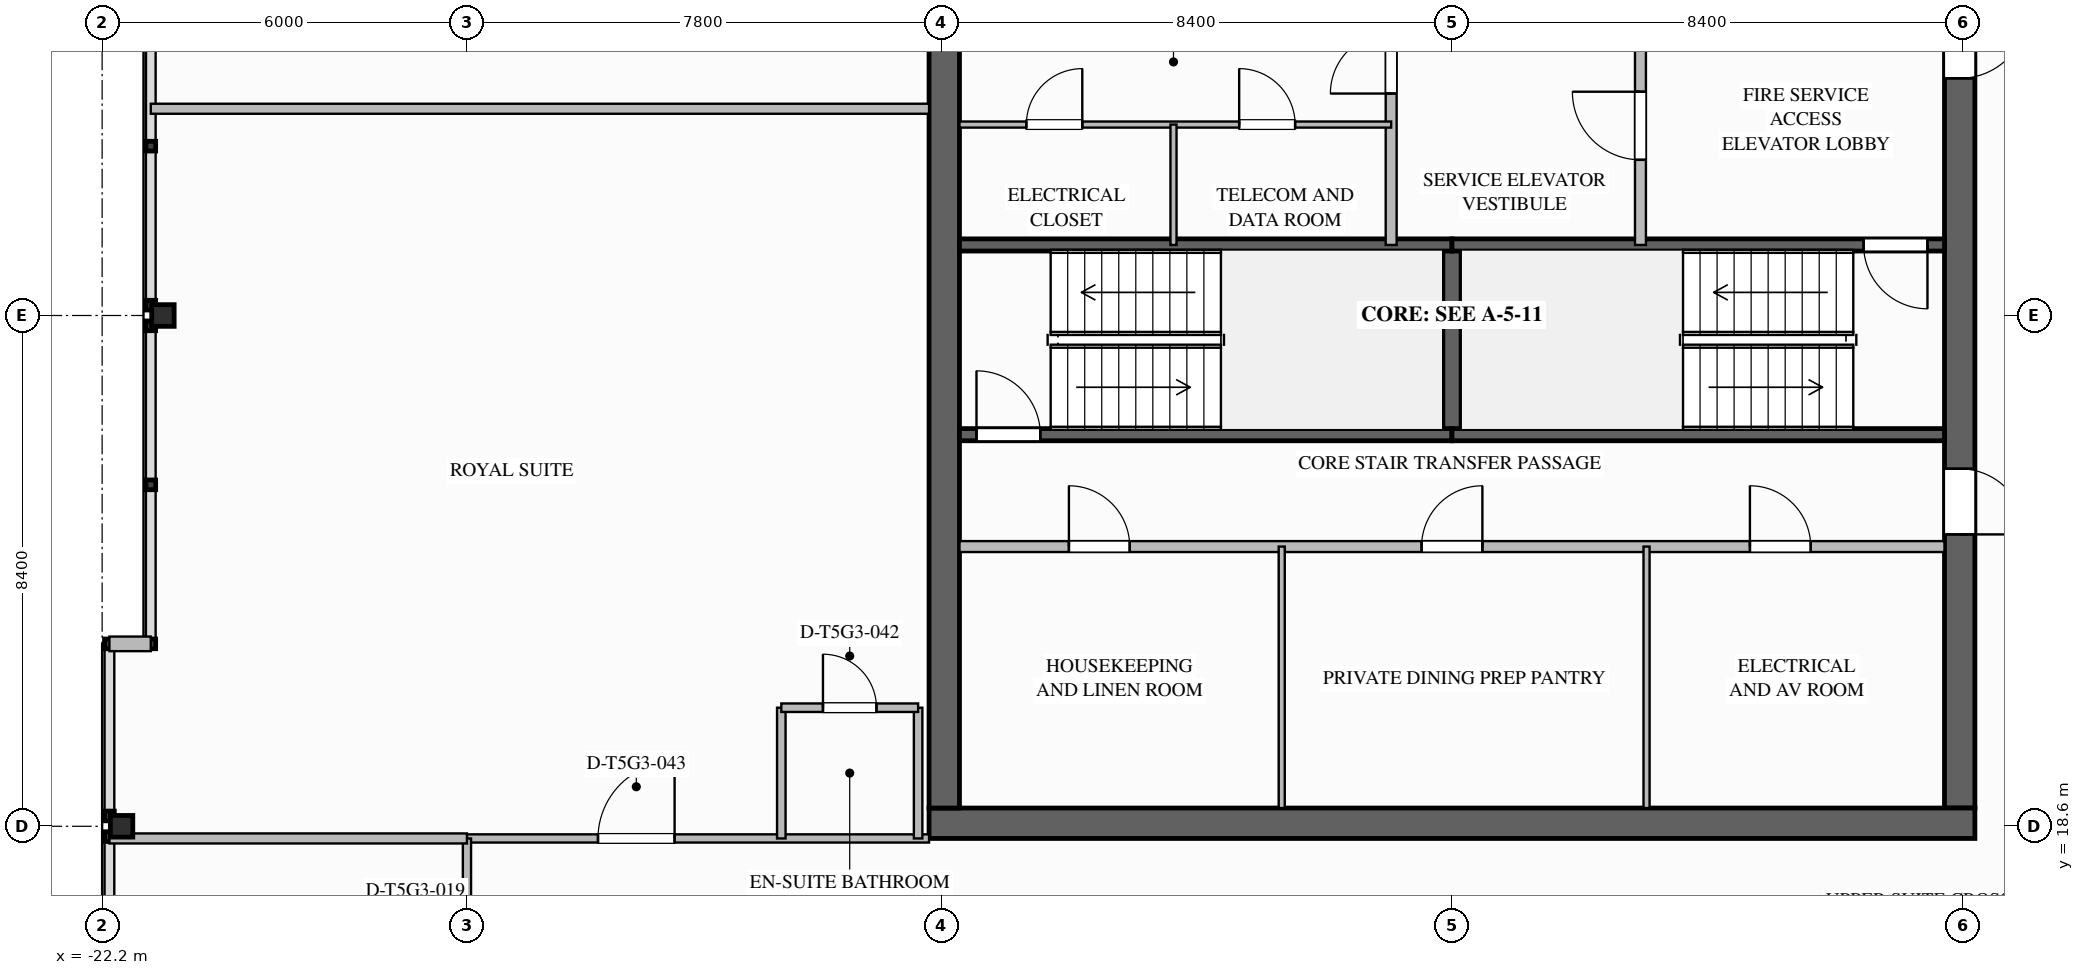
"""IFC4 building model, lengths in metres.
Left out: names, types, materials, properties, quantities, classifications, styles, units other than length and angle.
Written with IfcOpenShell. Run it as: python <this file> out.ifc"""

import sys

from ifc_helpers import new_model, si_unit, direction, frame, frame_2d, origin, origin_2d, place, context, subcontext, project, spatial, rectangle, i_section, extrude, element, fill, save


model = new_model("IFC4")
c1 = context("Model", 3, precision=1e-05, world=origin(), true_north=direction((0.0, 1.0)))
c2 = subcontext(c1, "Body", "Model", "MODEL_VIEW")
j1 = project(units=[si_unit("LENGTHUNIT", "METRE"), si_unit("PLANEANGLEUNIT", "RADIAN")], contexts=[c1])
p1 = place(None, origin())
s1 = spatial("IfcSite", under=j1, at=p1, CompositionType="ELEMENT")
p2 = place(p1, origin())
s2 = spatial("IfcBuilding", under=s1, at=p2, CompositionType="ELEMENT")
p3 = place(p2, frame((0.0, 0.0, 286.9)))
s3 = spatial("IfcBuildingStorey", under=s2, at=p3, CompositionType="ELEMENT", Elevation=286.9)
p4 = place(p3, frame((8.35, 35.1, 0.0), z_axis=(0.0, 0.0, 1.0), x_axis=(0.0, -1.0, 0.0)))
e1 = element("IfcWall", 1, at=p4, inside=s3, PredefinedType="SHEAR", context=c2, shape_type="SweptSolid", body=[
    extrude(rectangle(XDim=16.2, YDim=0.5, at=frame_2d((8.1, 0.0))), origin(), (0.0, 0.0, 1.0), 3.65),
])
p5 = place(p4, frame((3.08, 0.0, 0.0)))
e2 = element("IfcOpeningElement", 2, at=p5, cuts=e1, PredefinedType="OPENING", context=c2, shape_type="SweptSolid", body=[
    extrude(rectangle(XDim=1.12, YDim=2.1, at=frame_2d((0.56, 1.05))), frame((0.0, 0.26, 0.0), z_axis=(0.0, -1.0, 0.0), x_axis=(1.0, 0.0, 0.0)), (0.0, 0.0, 1.0), 0.52),
])
p6 = place(p4, frame((10.62, 0.0, 0.0)))
e3 = element("IfcOpeningElement", 3, at=p6, cuts=e1, PredefinedType="OPENING", context=c2, shape_type="SweptSolid", body=[
    extrude(rectangle(XDim=1.08, YDim=2.04, at=frame_2d((0.54, 1.02))), frame((0.0, 0.26, 0.0), z_axis=(0.0, -1.0, 0.0), x_axis=(1.0, 0.0, 0.0)), (0.0, 0.0, 1.0), 0.52),
])
p7 = place(p3, frame((8.6, 18.65, 0.0), z_axis=(0.0, 0.0, 1.0), x_axis=(-1.0, 0.0, 0.0)))
e4 = element("IfcWall", 4, at=p7, inside=s3, PredefinedType="SHEAR", context=c2, shape_type="SweptSolid", body=[
    extrude(rectangle(XDim=17.2, YDim=0.5, at=frame_2d((8.6, 0.0))), origin(), (0.0, 0.0, 1.0), 3.65),
])
p8 = place(p3, frame((-8.35, 18.9, 0.0), z_axis=(0.0, 0.0, 1.0), x_axis=(0.0, 1.0, 0.0)))
e5 = element("IfcWall", 5, at=p8, inside=s3, PredefinedType="SHEAR", context=c2, shape_type="SweptSolid", body=[
    extrude(rectangle(XDim=16.2, YDim=0.5, at=frame_2d((8.1, 0.0))), origin(), (0.0, 0.0, 1.0), 3.65),
])
for number, where, z_axis, x_axis in (
    (6, (-21.88, 18.6, 0.0), (0.0, 0.0, 1.0), (1.0, 0.0, 0.0)),
    (7, (-21.2, 27.0, 0.0), (0.0, 0.0, 1.0), (1.0, 0.0, 0.0)),
):
    element("IfcColumn", number, at=place(p3, frame(where, z_axis=z_axis, x_axis=x_axis)), inside=s3, PredefinedType="COLUMN", context=c2, shape_type="SweptSolid", body=[
        extrude(i_section(OverallWidth=0.369, OverallDepth=0.356, WebThickness=0.011, FlangeThickness=0.018, FilletRadius=0.025, at=origin_2d()), origin(), (0.0, 0.0, 1.0), 3.647),
    ])
p9 = place(p3, frame((-22.08, 21.6, 0.0), z_axis=(0.0, 0.0, 1.0), x_axis=(1.0, 0.0, 0.0)))
e8 = element("IfcWall", 8, at=p9, inside=s3, PredefinedType="STANDARD", context=c2, shape_type="SweptSolid", body=[
    extrude(rectangle(XDim=0.68, YDim=0.24, at=frame_2d((0.34, 0.0))), origin(), (0.0, 0.0, 1.0), 3.39),
])
p10 = place(p3, frame((0.0, 25.04, 0.0), z_axis=(0.0, 0.0, 1.0), x_axis=(0.0, 1.0, 0.0)))
e9 = element("IfcWall", 9, at=p10, inside=s3, PredefinedType="SOLIDWALL", context=c2, shape_type="SweptSolid", body=[
    extrude(rectangle(XDim=3.12, YDim=0.3, at=frame_2d((1.56, 0.0))), origin(), (0.0, 0.0, 1.0), 3.39),
])
p11 = place(p3, frame((-8.1, 25.04, 0.0), z_axis=(0.0, 0.0, 1.0), x_axis=(1.0, 0.0, 0.0)))
e10 = element("IfcWall", 10, at=p11, inside=s3, PredefinedType="SOLIDWALL", context=c2, shape_type="SweptSolid", body=[
    extrude(rectangle(XDim=8.1, YDim=0.2, at=frame_2d((4.05, 0.0))), origin(), (0.0, 0.0, 1.0), 3.39),
])
p12 = place(p11, frame((0.28, 0.0, 0.0)))
e11 = element("IfcOpeningElement", 11, at=p12, cuts=e10, PredefinedType="OPENING", context=c2, shape_type="SweptSolid", body=[
    extrude(rectangle(XDim=1.05, YDim=2.1, at=frame_2d((0.525, 1.05))), frame((0.0, 0.11, 0.0), z_axis=(0.0, -1.0, 0.0), x_axis=(1.0, 0.0, 0.0)), (0.0, 0.0, 1.0), 0.22),
])
for number, where, z_axis, x_axis in (
    (12, (-8.1, 28.16, 0.0), (0.0, 0.0, 1.0), (1.0, 0.0, 0.0)),
    (13, (0.0, 25.04, 0.0), (0.0, 0.0, 1.0), (1.0, 0.0, 0.0)),
):
    element("IfcWall", number, at=place(p3, frame(where, z_axis=z_axis, x_axis=x_axis)), inside=s3, PredefinedType="SOLIDWALL", context=c2, shape_type="SweptSolid", body=[
        extrude(rectangle(XDim=8.1, YDim=0.2, at=frame_2d((4.05, 0.0))), origin(), (0.0, 0.0, 1.0), 3.39),
    ])
p13 = place(p3, frame((8.1, 28.16, 0.0), z_axis=(0.0, 0.0, 1.0), x_axis=(-1.0, 0.0, 0.0)))
e14 = element("IfcWall", 14, at=p13, inside=s3, PredefinedType="SOLIDWALL", context=c2, shape_type="SweptSolid", body=[
    extrude(rectangle(XDim=8.1, YDim=0.2, at=frame_2d((4.05, 0.0))), origin(), (0.0, 0.0, 1.0), 3.39),
])
p14 = place(p13, frame((0.28, 0.0, 0.0)))
e15 = element("IfcOpeningElement", 15, at=p14, cuts=e14, PredefinedType="OPENING", context=c2, shape_type="SweptSolid", body=[
    extrude(rectangle(XDim=1.05, YDim=2.1, at=frame_2d((0.525, 1.05))), frame((0.0, 0.11, 0.0), z_axis=(0.0, -1.0, 0.0), x_axis=(1.0, 0.0, 0.0)), (0.0, 0.0, 1.0), 0.22),
])
p15 = place(p3, frame((3.1, 28.16, 0.0), z_axis=(0.0, 0.0, 1.0), x_axis=(0.0, 1.0, 0.0)))
e16 = element("IfcWall", 16, at=p15, inside=s3, PredefinedType="SOLIDWALL", context=c2, shape_type="SweptSolid", body=[
    extrude(rectangle(XDim=4.06, YDim=0.18, at=frame_2d((2.03, 0.0))), origin(), (0.0, 0.0, 1.0), 3.39),
])
p16 = place(p15, frame((1.4, 0.0, 0.0)))
e17 = element("IfcOpeningElement", 17, at=p16, cuts=e16, PredefinedType="OPENING", context=c2, shape_type="SweptSolid", body=[
    extrude(rectangle(XDim=1.12, YDim=2.1, at=frame_2d((0.56, 1.05))), frame((0.0, 0.1, 0.0), z_axis=(0.0, -1.0, 0.0), x_axis=(1.0, 0.0, 0.0)), (0.0, 0.0, 1.0), 0.2),
])
p17 = place(p3, frame((-1.0, 28.16, 0.0), z_axis=(0.0, 0.0, 1.0), x_axis=(0.0, 1.0, 0.0)))
e18 = element("IfcWall", 18, at=p17, inside=s3, PredefinedType="SOLIDWALL", context=c2, shape_type="SweptSolid", body=[
    extrude(rectangle(XDim=4.02, YDim=0.18, at=frame_2d((2.01, 0.0))), origin(), (0.0, 0.0, 1.0), 3.39),
])
p18 = place(p17, frame((2.49, 0.0, 0.0)))
e19 = element("IfcOpeningElement", 19, at=p18, cuts=e18, PredefinedType="OPENING", context=c2, shape_type="SweptSolid", body=[
    extrude(rectangle(XDim=1.0, YDim=2.1, at=frame_2d((0.5, 1.05))), frame((0.0, 0.1, 0.0), z_axis=(0.0, -1.0, 0.0), x_axis=(1.0, 0.0, 0.0)), (0.0, 0.0, 1.0), 0.2),
])
p19 = place(p3, frame((-8.1, 30.14, 0.0), z_axis=(0.0, 0.0, 1.0), x_axis=(1.0, 0.0, 0.0)))
e20 = element("IfcWall", 20, at=p19, inside=s3, PredefinedType="PARTITIONING", context=c2, shape_type="SweptSolid", body=[
    extrude(rectangle(XDim=7.1, YDim=0.1, at=frame_2d((3.55, 0.0))), origin(), (0.0, 0.0, 1.0), 3.39),
])
p20 = place(p19, frame((1.1, 0.0, 0.0)))
e21 = element("IfcOpeningElement", 21, at=p20, cuts=e20, PredefinedType="OPENING", context=c2, shape_type="SweptSolid", body=[
    extrude(rectangle(XDim=0.92, YDim=2.1, at=frame_2d((0.46, 1.05))), frame((0.0, 0.06, 0.0), z_axis=(0.0, -1.0, 0.0), x_axis=(1.0, 0.0, 0.0)), (0.0, 0.0, 1.0), 0.12),
])
p21 = place(p19, frame((4.6, 0.0, 0.0)))
e22 = element("IfcOpeningElement", 22, at=p21, cuts=e20, PredefinedType="OPENING", context=c2, shape_type="SweptSolid", body=[
    extrude(rectangle(XDim=0.92, YDim=2.1, at=frame_2d((0.46, 1.05))), frame((0.0, 0.06, 0.0), z_axis=(0.0, -1.0, 0.0), x_axis=(1.0, 0.0, 0.0)), (0.0, 0.0, 1.0), 0.12),
])
p22 = place(p3, frame((-4.58, 28.16, 0.0), z_axis=(0.0, 0.0, 1.0), x_axis=(0.0, 1.0, 0.0)))
e23 = element("IfcWall", 23, at=p22, inside=s3, PredefinedType="PARTITIONING", context=c2, shape_type="SweptSolid", body=[
    extrude(rectangle(XDim=1.98, YDim=0.1, at=frame_2d((0.99, 0.0))), origin(), (0.0, 0.0, 1.0), 3.39),
])
p23 = place(p3, frame((-8.1, 23.2, 0.0), z_axis=(0.0, 0.0, 1.0), x_axis=(1.0, 0.0, 0.0)))
e24 = element("IfcWall", 24, at=p23, inside=s3, PredefinedType="SOLIDWALL", context=c2, shape_type="SweptSolid", body=[
    extrude(rectangle(XDim=16.2, YDim=0.18, at=frame_2d((8.1, 0.0))), origin(), (0.0, 0.0, 1.0), 3.39),
])
p24 = place(p23, frame((1.8, 0.0, 0.0)))
e25 = element("IfcOpeningElement", 25, at=p24, cuts=e24, PredefinedType="OPENING", context=c2, shape_type="SweptSolid", body=[
    extrude(rectangle(XDim=1.0, YDim=2.1, at=frame_2d((0.5, 1.05))), frame((0.0, 0.1, 0.0), z_axis=(0.0, -1.0, 0.0), x_axis=(1.0, 0.0, 0.0)), (0.0, 0.0, 1.0), 0.2),
])
p25 = place(p23, frame((7.6, 0.0, 0.0)))
e26 = element("IfcOpeningElement", 26, at=p25, cuts=e24, PredefinedType="OPENING", context=c2, shape_type="SweptSolid", body=[
    extrude(rectangle(XDim=1.0, YDim=2.1, at=frame_2d((0.5, 1.05))), frame((0.0, 0.1, 0.0), z_axis=(0.0, -1.0, 0.0), x_axis=(1.0, 0.0, 0.0)), (0.0, 0.0, 1.0), 0.2),
])
p26 = place(p23, frame((13.0, 0.0, 0.0)))
e27 = element("IfcOpeningElement", 27, at=p26, cuts=e24, PredefinedType="OPENING", context=c2, shape_type="SweptSolid", body=[
    extrude(rectangle(XDim=1.0, YDim=2.1, at=frame_2d((0.5, 1.05))), frame((0.0, 0.1, 0.0), z_axis=(0.0, -1.0, 0.0), x_axis=(1.0, 0.0, 0.0)), (0.0, 0.0, 1.0), 0.2),
])
for number, where, z_axis, x_axis in (
    (28, (-2.8, 18.9, 0.0), (0.0, 0.0, 1.0), (0.0, 1.0, 0.0)),
    (29, (3.2, 18.9, 0.0), (0.0, 0.0, 1.0), (0.0, 1.0, 0.0)),
):
    element("IfcWall", number, at=place(p3, frame(where, z_axis=z_axis, x_axis=x_axis)), inside=s3, PredefinedType="PARTITIONING", context=c2, shape_type="SweptSolid", body=[
        extrude(rectangle(XDim=4.3, YDim=0.1, at=frame_2d((2.15, 0.0))), origin(), (0.0, 0.0, 1.0), 3.39),
    ])
p27 = place(p3, frame((-16.2, 18.4, 0.0), z_axis=(0.0, 0.0, 1.0), x_axis=(1.0, 0.0, 0.0)))
e30 = element("IfcWall", 30, at=p27, inside=s3, PredefinedType="PARTITIONING", context=c2, shape_type="SweptSolid", body=[
    extrude(rectangle(XDim=7.6, YDim=0.135, at=frame_2d((3.8, 0.0))), origin(), (0.0, 0.0, 1.0), 2.768),
])
p28 = place(p27, frame((2.155, 0.0, 0.0)))
e31 = element("IfcOpeningElement", 31, at=p28, cuts=e30, PredefinedType="OPENING", context=c2, shape_type="SweptSolid", body=[
    extrude(rectangle(XDim=1.26, YDim=2.2, at=frame_2d((0.63, 1.1))), frame((0.0, 0.077, 0.0), z_axis=(0.0, -1.0, 0.0), x_axis=(1.0, 0.0, 0.0)), (0.0, 0.0, 1.0), 0.155),
])
p29 = place(p3, frame((-16.2, 15.5, 0.0), z_axis=(0.0, 0.0, 1.0), x_axis=(0.0, 1.0, 0.0)))
e32 = element("IfcWall", 32, at=p29, inside=s3, PredefinedType="PARTITIONING", context=c2, shape_type="SweptSolid", body=[
    extrude(rectangle(XDim=2.9, YDim=0.135, at=frame_2d((1.45, 0.0))), origin(), (0.0, 0.0, 1.0), 2.764),
])
p30 = place(p29, frame((0.52, 0.0, 0.0)))
e33 = element("IfcOpeningElement", 33, at=p30, cuts=e32, PredefinedType="OPENING", context=c2, shape_type="SweptSolid", body=[
    extrude(rectangle(XDim=1.02, YDim=2.15, at=frame_2d((0.51, 1.075))), frame((0.0, 0.077, 0.0), z_axis=(0.0, -1.0, 0.0), x_axis=(1.0, 0.0, 0.0)), (0.0, 0.0, 1.0), 0.155),
])
p31 = place(p3, frame((-22.08, 18.4, 0.0), z_axis=(0.0, 0.0, 1.0), x_axis=(1.0, 0.0, 0.0)))
e34 = element("IfcWall", 34, at=p31, inside=s3, PredefinedType="PARTITIONING", context=c2, shape_type="SweptSolid", body=[
    extrude(rectangle(XDim=5.88, YDim=0.165, at=frame_2d((2.94, 0.0))), origin(), (0.0, 0.0, 1.0), 2.764),
])
p32 = place(p3, frame((-21.4, 30.4, 0.0), z_axis=(0.0, 0.0, 1.0), x_axis=(1.0, 0.0, 0.0)))
e35 = element("IfcWall", 35, at=p32, inside=s3, PredefinedType="PARTITIONING", context=c2, shape_type="SweptSolid", body=[
    extrude(rectangle(XDim=12.8, YDim=0.165, at=frame_2d((6.4, 0.0))), origin(), (0.0, 0.0, 1.0), 3.39),
])
for number, where, z_axis, x_axis in (
    (36, (-11.03, 18.4, 0.0), (0.0, 0.0, 1.0), (0.0, 1.0, 0.0)),
    (37, (-8.78, 18.4, 0.0), (0.0, 0.0, 1.0), (0.0, 1.0, 0.0)),
):
    element("IfcWall", number, at=place(p3, frame(where, z_axis=z_axis, x_axis=x_axis)), inside=s3, PredefinedType="PLUMBINGWALL", context=c2, shape_type="SweptSolid", body=[
        extrude(rectangle(XDim=2.15, YDim=0.14, at=frame_2d((1.075, 0.0))), origin(), (0.0, 0.0, 1.0), 3.39),
    ])
p33 = place(p3, frame((-11.03, 20.55, 0.0), z_axis=(0.0, 0.0, 1.0), x_axis=(1.0, 0.0, 0.0)))
e38 = element("IfcWall", 38, at=p33, inside=s3, PredefinedType="PLUMBINGWALL", context=c2, shape_type="SweptSolid", body=[
    extrude(rectangle(XDim=2.25, YDim=0.14, at=frame_2d((1.125, 0.0))), origin(), (0.0, 0.0, 1.0), 3.39),
])
p34 = place(p33, frame((0.685, 0.0, 0.0)))
e39 = element("IfcOpeningElement", 39, at=p34, cuts=e38, PredefinedType="OPENING", context=c2, shape_type="SweptSolid", body=[
    extrude(rectangle(XDim=0.88, YDim=2.1, at=frame_2d((0.44, 1.05))), frame((0.0, 0.08, 0.0), z_axis=(0.0, -1.0, 0.0), x_axis=(1.0, 0.0, 0.0)), (0.0, 0.0, 1.0), 0.16),
])
p35 = place(p12, origin())
e40 = element("IfcDoor", 40, at=p35, inside=s3, OperationType="SINGLE_SWING_LEFT", PredefinedType="DOOR", context=c2, shape_type="SweptSolid", body=[
    extrude(rectangle(XDim=1.05, YDim=2.1, at=frame_2d((0.525, 1.05))), frame((0.0, 0.025, 0.0), z_axis=(0.0, -1.0, 0.0), x_axis=(1.0, 0.0, 0.0)), (0.0, 0.0, 1.0), 0.05),
])
fill(e11, e40)
p36 = place(p14, origin())
e41 = element("IfcDoor", 41, at=p36, inside=s3, OperationType="SINGLE_SWING_LEFT", PredefinedType="DOOR", context=c2, shape_type="SweptSolid", body=[
    extrude(rectangle(XDim=1.05, YDim=2.1, at=frame_2d((0.525, 1.05))), frame((0.0, 0.025, 0.0), z_axis=(0.0, -1.0, 0.0), x_axis=(1.0, 0.0, 0.0)), (0.0, 0.0, 1.0), 0.05),
])
fill(e15, e41)
p37 = place(p16, origin())
e42 = element("IfcDoor", 42, at=p37, inside=s3, OperationType="SINGLE_SWING_RIGHT", PredefinedType="DOOR", context=c2, shape_type="SweptSolid", body=[
    extrude(rectangle(XDim=1.12, YDim=2.1, at=frame_2d((0.56, 1.05))), frame((0.0, 0.025, 0.0), z_axis=(0.0, -1.0, 0.0), x_axis=(1.0, 0.0, 0.0)), (0.0, 0.0, 1.0), 0.05),
])
fill(e17, e42)
p38 = place(p5, origin())
e43 = element("IfcDoor", 43, at=p38, inside=s3, OperationType="SINGLE_SWING_LEFT", PredefinedType="DOOR", context=c2, shape_type="SweptSolid", body=[
    extrude(rectangle(XDim=1.12, YDim=2.1, at=frame_2d((0.56, 1.05))), frame((0.0, 0.025, 0.0), z_axis=(0.0, -1.0, 0.0), x_axis=(1.0, 0.0, 0.0)), (0.0, 0.0, 1.0), 0.05),
])
fill(e2, e43)
p39 = place(p18, origin())
e44 = element("IfcDoor", 44, at=p39, inside=s3, OperationType="SINGLE_SWING_LEFT", PredefinedType="DOOR", context=c2, shape_type="SweptSolid", body=[
    extrude(rectangle(XDim=1.0, YDim=2.1, at=frame_2d((0.5, 1.05))), frame((0.0, 0.025, 0.0), z_axis=(0.0, -1.0, 0.0), x_axis=(1.0, 0.0, 0.0)), (0.0, 0.0, 1.0), 0.05),
])
fill(e19, e44)
p40 = place(p20, origin())
e45 = element("IfcDoor", 45, at=p40, inside=s3, OperationType="SINGLE_SWING_RIGHT", PredefinedType="DOOR", context=c2, shape_type="SweptSolid", body=[
    extrude(rectangle(XDim=0.92, YDim=2.1, at=frame_2d((0.46, 1.05))), frame((0.0, 0.025, 0.0), z_axis=(0.0, -1.0, 0.0), x_axis=(1.0, 0.0, 0.0)), (0.0, 0.0, 1.0), 0.05),
])
fill(e21, e45)
p41 = place(p21, origin())
e46 = element("IfcDoor", 46, at=p41, inside=s3, OperationType="SINGLE_SWING_LEFT", PredefinedType="DOOR", context=c2, shape_type="SweptSolid", body=[
    extrude(rectangle(XDim=0.92, YDim=2.1, at=frame_2d((0.46, 1.05))), frame((0.0, 0.025, 0.0), z_axis=(0.0, -1.0, 0.0), x_axis=(1.0, 0.0, 0.0)), (0.0, 0.0, 1.0), 0.05),
])
fill(e22, e46)
p42 = place(p6, origin())
e47 = element("IfcDoor", 47, at=p42, inside=s3, OperationType="SINGLE_SWING_RIGHT", PredefinedType="DOOR", context=c2, shape_type="SweptSolid", body=[
    extrude(rectangle(XDim=1.08, YDim=2.04, at=frame_2d((0.54, 1.02))), frame((0.0, 0.025, 0.0), z_axis=(0.0, -1.0, 0.0), x_axis=(1.0, 0.0, 0.0)), (0.0, 0.0, 1.0), 0.05),
])
fill(e3, e47)
p43 = place(p24, origin())
e48 = element("IfcDoor", 48, at=p43, inside=s3, OperationType="SINGLE_SWING_LEFT", PredefinedType="DOOR", context=c2, shape_type="SweptSolid", body=[
    extrude(rectangle(XDim=1.0, YDim=2.1, at=frame_2d((0.5, 1.05))), frame((0.0, 0.025, 0.0), z_axis=(0.0, -1.0, 0.0), x_axis=(1.0, 0.0, 0.0)), (0.0, 0.0, 1.0), 0.05),
])
fill(e25, e48)
p44 = place(p25, origin())
e49 = element("IfcDoor", 49, at=p44, inside=s3, OperationType="SINGLE_SWING_RIGHT", PredefinedType="DOOR", context=c2, shape_type="SweptSolid", body=[
    extrude(rectangle(XDim=1.0, YDim=2.1, at=frame_2d((0.5, 1.05))), frame((0.0, 0.025, 0.0), z_axis=(0.0, -1.0, 0.0), x_axis=(1.0, 0.0, 0.0)), (0.0, 0.0, 1.0), 0.05),
])
fill(e26, e49)
p45 = place(p26, origin())
e50 = element("IfcDoor", 50, at=p45, inside=s3, OperationType="SINGLE_SWING_LEFT", PredefinedType="DOOR", context=c2, shape_type="SweptSolid", body=[
    extrude(rectangle(XDim=1.0, YDim=2.1, at=frame_2d((0.5, 1.05))), frame((0.0, 0.025, 0.0), z_axis=(0.0, -1.0, 0.0), x_axis=(1.0, 0.0, 0.0)), (0.0, 0.0, 1.0), 0.05),
])
fill(e27, e50)
p46 = place(p34, origin())
e51 = element("IfcDoor", 51, at=p46, inside=s3, OperationType="SINGLE_SWING_LEFT", PredefinedType="DOOR", context=c2, shape_type="SweptSolid", body=[
    extrude(rectangle(XDim=0.88, YDim=2.1, at=frame_2d((0.44, 1.05))), frame((0.0, 0.025, 0.0), z_axis=(0.0, -1.0, 0.0), x_axis=(1.0, 0.0, 0.0)), (0.0, 0.0, 1.0), 0.05),
])
fill(e39, e51)
p47 = place(p28, origin())
e52 = element("IfcDoor", 52, at=p47, inside=s3, OperationType="SINGLE_SWING_RIGHT", PredefinedType="DOOR", context=c2, shape_type="SweptSolid", body=[
    extrude(rectangle(XDim=1.26, YDim=2.2, at=frame_2d((0.63, 1.1))), frame((0.0, 0.025, 0.0), z_axis=(0.0, -1.0, 0.0), x_axis=(1.0, 0.0, 0.0)), (0.0, 0.0, 1.0), 0.05),
])
fill(e31, e52)
save(model, sys.argv[1])
